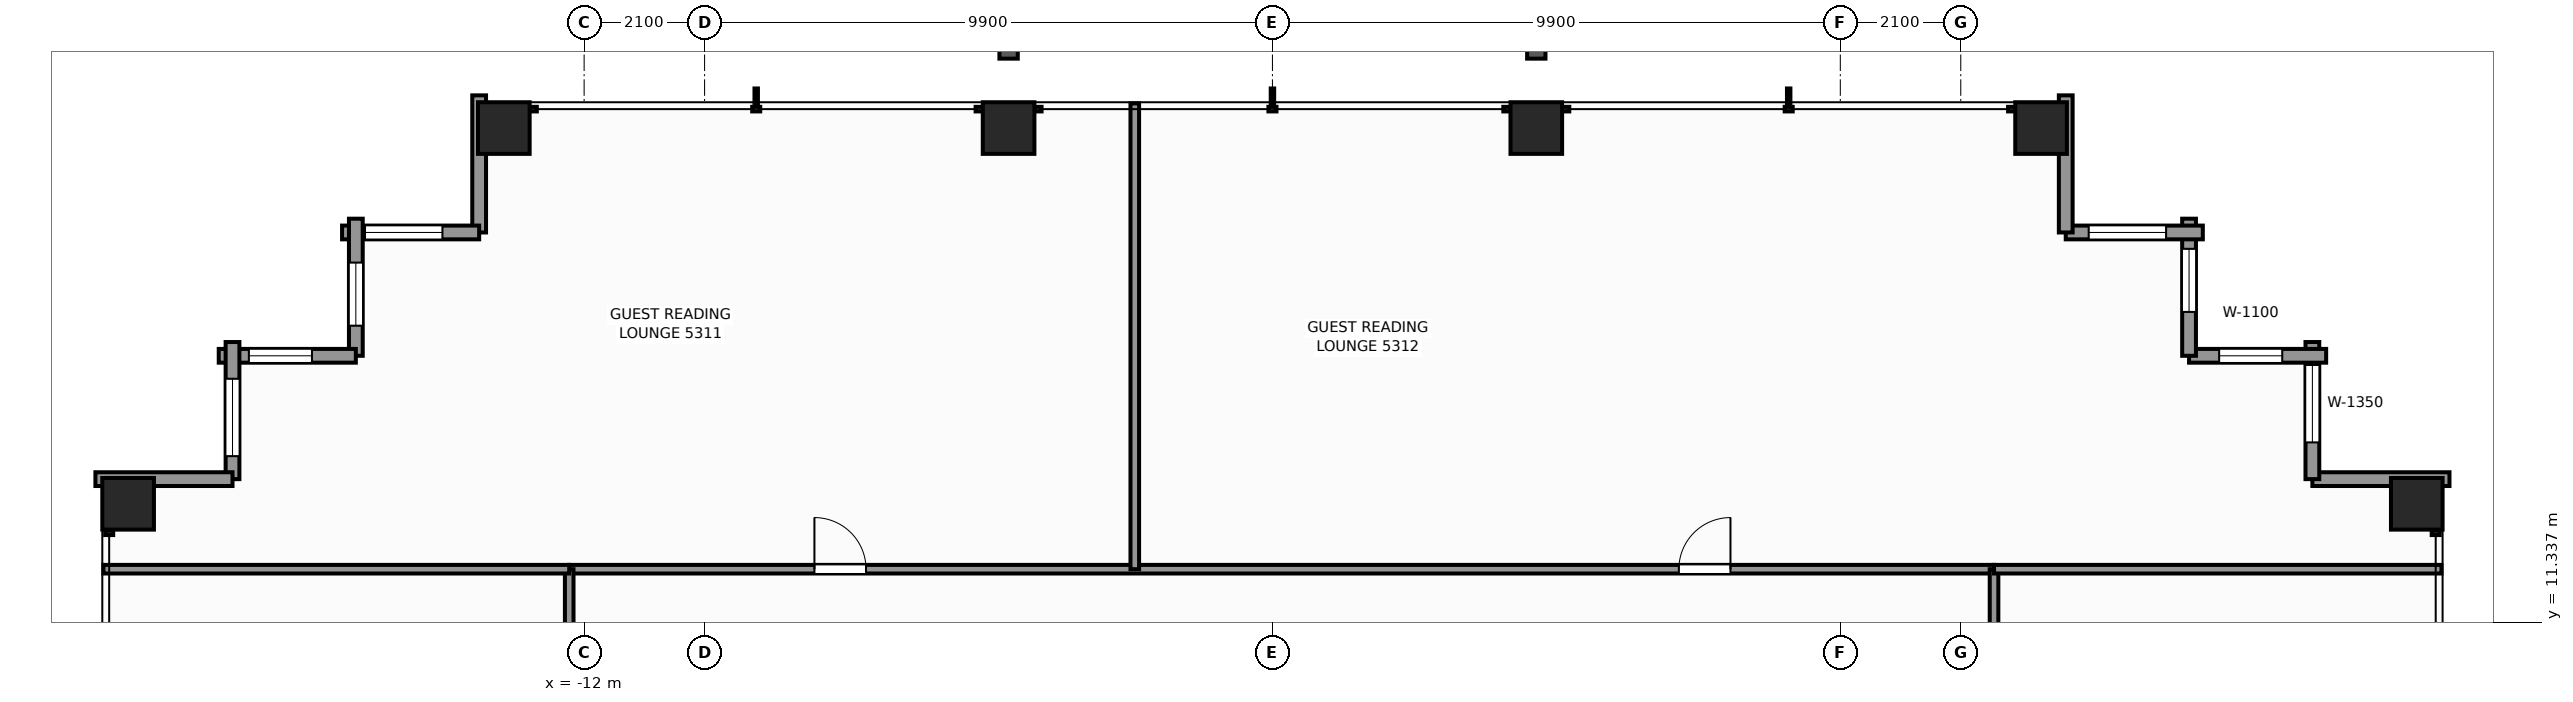
"""IFC4 building model, lengths in metres.
Left out: names, types, materials, properties, quantities, classifications, styles, units other than length and angle.
Written with IfcOpenShell. Run it as: python <this file> out.ifc"""

import sys

from ifc_helpers import new_model, si_unit, direction, frame, frame_2d, origin, origin_2d, place, context, subcontext, project, spatial, rectangle, extrude, element, fill, save


model = new_model("IFC4")
c1 = context("Model", 3, precision=1e-05, world=origin(), true_north=direction((0.0, 1.0)))
c2 = subcontext(c1, "Body", "Model", "MODEL_VIEW")
j1 = project(units=[si_unit("LENGTHUNIT", "METRE"), si_unit("PLANEANGLEUNIT", "RADIAN")], contexts=[c1])
p1 = place(None, origin())
s1 = spatial("IfcSite", under=j1, at=p1, CompositionType="ELEMENT")
p2 = place(p1, origin())
s2 = spatial("IfcBuilding", under=s1, at=p2, CompositionType="ELEMENT")
p3 = place(p2, frame((0.0, 0.0, 183.3)))
s3 = spatial("IfcBuildingStorey", under=s2, at=p3, CompositionType="ELEMENT", Elevation=183.3)
for number, where, z_axis, x_axis in (
    (1, (-13.4, 19.95, 0.0), (0.0, 0.0, 1.0), (1.0, 0.0, 0.0)),
    (2, (-4.6, 19.95, 0.0), (0.0, 0.0, 1.0), (1.0, 0.0, 0.0)),
    (3, (4.6, 19.95, 0.0), (0.0, 0.0, 1.0), (1.0, 0.0, 0.0)),
    (4, (13.4, 19.95, 0.0), (0.0, 0.0, 1.0), (1.0, 0.0, 0.0)),
    (5, (-19.95, 13.4, 0.0), (0.0, 0.0, 1.0), (1.0, 0.0, 0.0)),
    (6, (19.95, 13.4, 0.0), (0.0, 0.0, 1.0), (1.0, 0.0, 0.0)),
):
    element("IfcColumn", number, at=place(p3, frame(where, z_axis=z_axis, x_axis=x_axis)), inside=s3, PredefinedType="COLUMN", context=c2, shape_type="SweptSolid", body=[
        extrude(rectangle(XDim=0.9, YDim=0.9, at=origin_2d()), origin(), (0.0, 0.0, 1.0), 3.3),
    ])
p4 = place(p3, frame((18.13, 13.83, 0.0), z_axis=(0.0, 0.0, 1.0), x_axis=(1.0, 0.0, 0.0)))
e7 = element("IfcWall", 7, at=p4, inside=s3, PredefinedType="STANDARD", context=c2, shape_type="SweptSolid", body=[
    extrude(rectangle(XDim=2.39, YDim=0.24, at=frame_2d((1.195, 0.0))), origin(), (0.0, 0.0, 1.0), 2.463),
])
p5 = place(p3, frame((18.13, 16.22, 0.0), z_axis=(0.0, 0.0, 1.0), x_axis=(0.0, -1.0, 0.0)))
e8 = element("IfcWall", 8, at=p5, inside=s3, PredefinedType="STANDARD", context=c2, shape_type="SweptSolid", body=[
    extrude(rectangle(XDim=2.39, YDim=0.24, at=frame_2d((1.195, 0.0))), origin(), (0.0, 0.0, 1.0), 2.463),
])
p6 = place(p5, frame((0.4, 0.0, 0.65)))
e9 = element("IfcOpeningElement", 9, at=p6, cuts=e8, PredefinedType="OPENING", context=c2, shape_type="SweptSolid", body=[
    extrude(rectangle(XDim=1.35, YDim=1.55, at=frame_2d((0.675, 0.775))), frame((0.0, 0.13, 0.0), z_axis=(0.0, -1.0, 0.0), x_axis=(1.0, 0.0, 0.0)), (0.0, 0.0, 1.0), 0.26),
])
p7 = place(p3, frame((15.98, 15.98, 0.0), z_axis=(0.0, 0.0, 1.0), x_axis=(1.0, 0.0, 0.0)))
e10 = element("IfcWall", 10, at=p7, inside=s3, PredefinedType="STANDARD", context=c2, shape_type="SweptSolid", body=[
    extrude(rectangle(XDim=2.39, YDim=0.24, at=frame_2d((1.195, 0.0))), origin(), (0.0, 0.0, 1.0), 2.463),
])
p8 = place(p7, frame((0.525, 0.0, 0.65)))
e11 = element("IfcOpeningElement", 11, at=p8, cuts=e10, PredefinedType="OPENING", context=c2, shape_type="SweptSolid", body=[
    extrude(rectangle(XDim=1.1, YDim=1.45, at=frame_2d((0.55, 0.725))), frame((0.0, 0.13, 0.0), z_axis=(0.0, -1.0, 0.0), x_axis=(1.0, 0.0, 0.0)), (0.0, 0.0, 1.0), 0.26),
])
p9 = place(p3, frame((15.98, 18.37, 0.0), z_axis=(0.0, 0.0, 1.0), x_axis=(0.0, -1.0, 0.0)))
e12 = element("IfcWall", 12, at=p9, inside=s3, PredefinedType="STANDARD", context=c2, shape_type="SweptSolid", body=[
    extrude(rectangle(XDim=2.39, YDim=0.24, at=frame_2d((1.195, 0.0))), origin(), (0.0, 0.0, 1.0), 2.463),
])
p10 = place(p9, frame((0.525, 0.0, 0.65)))
e13 = element("IfcOpeningElement", 13, at=p10, cuts=e12, PredefinedType="OPENING", context=c2, shape_type="SweptSolid", body=[
    extrude(rectangle(XDim=1.1, YDim=1.45, at=frame_2d((0.55, 0.725))), frame((0.0, 0.13, 0.0), z_axis=(0.0, -1.0, 0.0), x_axis=(1.0, 0.0, 0.0)), (0.0, 0.0, 1.0), 0.26),
])
p11 = place(p3, frame((13.83, 18.13, 0.0), z_axis=(0.0, 0.0, 1.0), x_axis=(1.0, 0.0, 0.0)))
e14 = element("IfcWall", 14, at=p11, inside=s3, PredefinedType="STANDARD", context=c2, shape_type="SweptSolid", body=[
    extrude(rectangle(XDim=2.39, YDim=0.24, at=frame_2d((1.195, 0.0))), origin(), (0.0, 0.0, 1.0), 2.463),
])
p12 = place(p11, frame((0.4, 0.0, 0.65)))
e15 = element("IfcOpeningElement", 15, at=p12, cuts=e14, PredefinedType="OPENING", context=c2, shape_type="SweptSolid", body=[
    extrude(rectangle(XDim=1.35, YDim=1.55, at=frame_2d((0.675, 0.775))), frame((0.0, 0.13, 0.0), z_axis=(0.0, -1.0, 0.0), x_axis=(1.0, 0.0, 0.0)), (0.0, 0.0, 1.0), 0.26),
])
for number, where, z_axis, x_axis in (
    (16, (13.83, 20.52, 0.0), (0.0, 0.0, 1.0), (0.0, -1.0, 0.0)),
    (17, (-13.83, 18.13, 0.0), (0.0, 0.0, 1.0), (0.0, 1.0, 0.0)),
):
    element("IfcWall", number, at=place(p3, frame(where, z_axis=z_axis, x_axis=x_axis)), inside=s3, PredefinedType="STANDARD", context=c2, shape_type="SweptSolid", body=[
        extrude(rectangle(XDim=2.39, YDim=0.24, at=frame_2d((1.195, 0.0))), origin(), (0.0, 0.0, 1.0), 2.463),
    ])
p13 = place(p3, frame((-16.22, 18.13, 0.0), z_axis=(0.0, 0.0, 1.0), x_axis=(1.0, 0.0, 0.0)))
e18 = element("IfcWall", 18, at=p13, inside=s3, PredefinedType="STANDARD", context=c2, shape_type="SweptSolid", body=[
    extrude(rectangle(XDim=2.39, YDim=0.24, at=frame_2d((1.195, 0.0))), origin(), (0.0, 0.0, 1.0), 2.463),
])
p14 = place(p13, frame((0.4, 0.0, 0.65)))
e19 = element("IfcOpeningElement", 19, at=p14, cuts=e18, PredefinedType="OPENING", context=c2, shape_type="SweptSolid", body=[
    extrude(rectangle(XDim=1.35, YDim=1.55, at=frame_2d((0.675, 0.775))), frame((0.0, 0.13, 0.0), z_axis=(0.0, -1.0, 0.0), x_axis=(1.0, 0.0, 0.0)), (0.0, 0.0, 1.0), 0.26),
])
p15 = place(p3, frame((-15.98, 15.98, 0.0), z_axis=(0.0, 0.0, 1.0), x_axis=(0.0, 1.0, 0.0)))
e20 = element("IfcWall", 20, at=p15, inside=s3, PredefinedType="STANDARD", context=c2, shape_type="SweptSolid", body=[
    extrude(rectangle(XDim=2.39, YDim=0.24, at=frame_2d((1.195, 0.0))), origin(), (0.0, 0.0, 1.0), 2.463),
])
p16 = place(p15, frame((0.525, 0.0, 0.65)))
e21 = element("IfcOpeningElement", 21, at=p16, cuts=e20, PredefinedType="OPENING", context=c2, shape_type="SweptSolid", body=[
    extrude(rectangle(XDim=1.1, YDim=1.45, at=frame_2d((0.55, 0.725))), frame((0.0, 0.13, 0.0), z_axis=(0.0, -1.0, 0.0), x_axis=(1.0, 0.0, 0.0)), (0.0, 0.0, 1.0), 0.26),
])
p17 = place(p3, frame((-18.37, 15.98, 0.0), z_axis=(0.0, 0.0, 1.0), x_axis=(1.0, 0.0, 0.0)))
e22 = element("IfcWall", 22, at=p17, inside=s3, PredefinedType="STANDARD", context=c2, shape_type="SweptSolid", body=[
    extrude(rectangle(XDim=2.39, YDim=0.24, at=frame_2d((1.195, 0.0))), origin(), (0.0, 0.0, 1.0), 2.463),
])
p18 = place(p17, frame((0.525, 0.0, 0.65)))
e23 = element("IfcOpeningElement", 23, at=p18, cuts=e22, PredefinedType="OPENING", context=c2, shape_type="SweptSolid", body=[
    extrude(rectangle(XDim=1.1, YDim=1.45, at=frame_2d((0.55, 0.725))), frame((0.0, 0.13, 0.0), z_axis=(0.0, -1.0, 0.0), x_axis=(1.0, 0.0, 0.0)), (0.0, 0.0, 1.0), 0.26),
])
p19 = place(p3, frame((-18.13, 13.83, 0.0), z_axis=(0.0, 0.0, 1.0), x_axis=(0.0, 1.0, 0.0)))
e24 = element("IfcWall", 24, at=p19, inside=s3, PredefinedType="STANDARD", context=c2, shape_type="SweptSolid", body=[
    extrude(rectangle(XDim=2.39, YDim=0.24, at=frame_2d((1.195, 0.0))), origin(), (0.0, 0.0, 1.0), 2.463),
])
p20 = place(p19, frame((0.4, 0.0, 0.65)))
e25 = element("IfcOpeningElement", 25, at=p20, cuts=e24, PredefinedType="OPENING", context=c2, shape_type="SweptSolid", body=[
    extrude(rectangle(XDim=1.35, YDim=1.55, at=frame_2d((0.675, 0.775))), frame((0.0, 0.13, 0.0), z_axis=(0.0, -1.0, 0.0), x_axis=(1.0, 0.0, 0.0)), (0.0, 0.0, 1.0), 0.26),
])
p21 = place(p3, frame((-20.52, 13.83, 0.0), z_axis=(0.0, 0.0, 1.0), x_axis=(1.0, 0.0, 0.0)))
e26 = element("IfcWall", 26, at=p21, inside=s3, PredefinedType="STANDARD", context=c2, shape_type="SweptSolid", body=[
    extrude(rectangle(XDim=2.39, YDim=0.24, at=frame_2d((1.195, 0.0))), origin(), (0.0, 0.0, 1.0), 2.463),
])
p22 = place(p3, frame((-12.26, 12.26, 0.0), z_axis=(0.0, 0.0, 1.0), x_axis=(1.0, 0.0, 0.0)))
e27 = element("IfcWall", 27, at=p22, inside=s3, PredefinedType="PARTITIONING", context=c2, shape_type="SweptSolid", body=[
    extrude(rectangle(XDim=24.84, YDim=0.15, at=frame_2d((12.42, 0.0))), origin(), (0.0, 0.0, 1.0), 2.369),
])
p23 = place(p22, frame((4.275, 0.0, 0.0)))
e28 = element("IfcOpeningElement", 28, at=p23, cuts=e27, PredefinedType="OPENING", context=c2, shape_type="SweptSolid", body=[
    extrude(rectangle(XDim=0.9, YDim=2.06, at=frame_2d((0.45, 1.03))), frame((0.0, 0.085, 0.0), z_axis=(0.0, -1.0, 0.0), x_axis=(1.0, 0.0, 0.0)), (0.0, 0.0, 1.0), 0.17),
])
p24 = place(p22, frame((19.345, 0.0, 0.0)))
e29 = element("IfcOpeningElement", 29, at=p24, cuts=e27, PredefinedType="OPENING", context=c2, shape_type="SweptSolid", body=[
    extrude(rectangle(XDim=0.9, YDim=2.06, at=frame_2d((0.45, 1.03))), frame((0.0, 0.085, 0.0), z_axis=(0.0, -1.0, 0.0), x_axis=(1.0, 0.0, 0.0)), (0.0, 0.0, 1.0), 0.17),
])
p25 = place(p3, frame((-12.26, -12.58, 0.0), z_axis=(0.0, 0.0, 1.0), x_axis=(0.0, 1.0, 0.0)))
e30 = element("IfcWall", 30, at=p25, inside=s3, PredefinedType="PARTITIONING", context=c2, shape_type="SweptSolid", body=[
    extrude(rectangle(XDim=24.84, YDim=0.15, at=frame_2d((12.42, 0.0))), origin(), (0.0, 0.0, 1.0), 2.369),
])
p26 = place(p25, frame((3.114, 0.0, 0.0)))
e31 = element("IfcOpeningElement", 31, at=p26, cuts=e30, PredefinedType="OPENING", context=c2, shape_type="SweptSolid", body=[
    extrude(rectangle(XDim=0.95, YDim=2.06, at=frame_2d((0.475, 1.03))), frame((0.0, 0.085, 0.0), z_axis=(0.0, -1.0, 0.0), x_axis=(1.0, 0.0, 0.0)), (0.0, 0.0, 1.0), 0.17),
])
p27 = place(p25, frame((9.119, 0.0, 0.0)))
e32 = element("IfcOpeningElement", 32, at=p27, cuts=e30, PredefinedType="OPENING", context=c2, shape_type="SweptSolid", body=[
    extrude(rectangle(XDim=0.95, YDim=2.06, at=frame_2d((0.475, 1.03))), frame((0.0, 0.085, 0.0), z_axis=(0.0, -1.0, 0.0), x_axis=(1.0, 0.0, 0.0)), (0.0, 0.0, 1.0), 0.17),
])
p28 = place(p25, frame((14.24, 0.0, 0.0)))
e33 = element("IfcOpeningElement", 33, at=p28, cuts=e30, PredefinedType="OPENING", context=c2, shape_type="SweptSolid", body=[
    extrude(rectangle(XDim=0.95, YDim=2.06, at=frame_2d((0.475, 1.03))), frame((0.0, 0.085, 0.0), z_axis=(0.0, -1.0, 0.0), x_axis=(1.0, 0.0, 0.0)), (0.0, 0.0, 1.0), 0.17),
])
p29 = place(p25, frame((19.574, 0.0, 0.0)))
e34 = element("IfcOpeningElement", 34, at=p29, cuts=e30, PredefinedType="OPENING", context=c2, shape_type="SweptSolid", body=[
    extrude(rectangle(XDim=0.95, YDim=2.06, at=frame_2d((0.475, 1.03))), frame((0.0, 0.085, 0.0), z_axis=(0.0, -1.0, 0.0), x_axis=(1.0, 0.0, 0.0)), (0.0, 0.0, 1.0), 0.17),
])
p30 = place(p25, frame((21.254, 0.0, 0.0)))
e35 = element("IfcOpeningElement", 35, at=p30, cuts=e30, PredefinedType="OPENING", context=c2, shape_type="SweptSolid", body=[
    extrude(rectangle(XDim=0.9, YDim=2.06, at=frame_2d((0.45, 1.03))), frame((0.0, 0.085, 0.0), z_axis=(0.0, -1.0, 0.0), x_axis=(1.0, 0.0, 0.0)), (0.0, 0.0, 1.0), 0.17),
])
p31 = place(p3, frame((12.58, -12.58, 0.0), z_axis=(0.0, 0.0, 1.0), x_axis=(0.0, 1.0, 0.0)))
e36 = element("IfcWall", 36, at=p31, inside=s3, PredefinedType="PARTITIONING", context=c2, shape_type="SweptSolid", body=[
    extrude(rectangle(XDim=24.84, YDim=0.15, at=frame_2d((12.42, 0.0))), origin(), (0.0, 0.0, 1.0), 2.369),
])
p32 = place(p31, frame((4.595, 0.0, 0.0)))
e37 = element("IfcOpeningElement", 37, at=p32, cuts=e36, PredefinedType="OPENING", context=c2, shape_type="SweptSolid", body=[
    extrude(rectangle(XDim=0.9, YDim=2.06, at=frame_2d((0.45, 1.03))), frame((0.0, 0.085, 0.0), z_axis=(0.0, -1.0, 0.0), x_axis=(1.0, 0.0, 0.0)), (0.0, 0.0, 1.0), 0.17),
])
p33 = place(p31, frame((19.665, 0.0, 0.0)))
e38 = element("IfcOpeningElement", 38, at=p33, cuts=e36, PredefinedType="OPENING", context=c2, shape_type="SweptSolid", body=[
    extrude(rectangle(XDim=0.9, YDim=2.06, at=frame_2d((0.45, 1.03))), frame((0.0, 0.085, 0.0), z_axis=(0.0, -1.0, 0.0), x_axis=(1.0, 0.0, 0.0)), (0.0, 0.0, 1.0), 0.17),
])
p34 = place(p3, frame((-20.38, 12.26, 0.0), z_axis=(0.0, 0.0, 1.0), x_axis=(1.0, 0.0, 0.0)))
e39 = element("IfcWall", 39, at=p34, inside=s3, PredefinedType="PARTITIONING", context=c2, shape_type="SweptSolid", body=[
    extrude(rectangle(XDim=8.12, YDim=0.15, at=frame_2d((4.06, 0.0))), origin(), (0.0, 0.0, 1.0), 2.369),
])
p35 = place(p3, frame((12.58, 12.26, 0.0), z_axis=(0.0, 0.0, 1.0), x_axis=(1.0, 0.0, 0.0)))
e40 = element("IfcWall", 40, at=p35, inside=s3, PredefinedType="PARTITIONING", context=c2, shape_type="SweptSolid", body=[
    extrude(rectangle(XDim=7.8, YDim=0.15, at=frame_2d((3.9, 0.0))), origin(), (0.0, 0.0, 1.0), 2.369),
])
p36 = place(p3, frame((-2.4, 12.26, 0.0), z_axis=(0.0, 0.0, 1.0), x_axis=(0.0, 1.0, 0.0)))
e41 = element("IfcWall", 41, at=p36, inside=s3, PredefinedType="PARTITIONING", context=c2, shape_type="SweptSolid", body=[
    extrude(rectangle(XDim=8.12, YDim=0.15, at=frame_2d((4.06, 0.0))), origin(), (0.0, 0.0, 1.0), 2.453),
])
p37 = place(p6, origin())
e42 = element("IfcWindow", 42, at=p37, inside=s3, PartitioningType="SINGLE_PANEL", PredefinedType="WINDOW", context=c2, shape_type="SweptSolid", body=[
    extrude(rectangle(XDim=1.35, YDim=1.55, at=frame_2d((0.675, 0.775))), frame((0.0, 0.03, 0.0), z_axis=(0.0, -1.0, 0.0), x_axis=(1.0, 0.0, 0.0)), (0.0, 0.0, 1.0), 0.06),
])
fill(e9, e42)
p38 = place(p8, origin())
e43 = element("IfcWindow", 43, at=p38, inside=s3, PartitioningType="SINGLE_PANEL", PredefinedType="WINDOW", context=c2, shape_type="SweptSolid", body=[
    extrude(rectangle(XDim=1.1, YDim=1.45, at=frame_2d((0.55, 0.725))), frame((0.0, 0.03, 0.0), z_axis=(0.0, -1.0, 0.0), x_axis=(1.0, 0.0, 0.0)), (0.0, 0.0, 1.0), 0.06),
])
fill(e11, e43)
p39 = place(p10, origin())
e44 = element("IfcWindow", 44, at=p39, inside=s3, PartitioningType="SINGLE_PANEL", PredefinedType="WINDOW", context=c2, shape_type="SweptSolid", body=[
    extrude(rectangle(XDim=1.1, YDim=1.45, at=frame_2d((0.55, 0.725))), frame((0.0, 0.03, 0.0), z_axis=(0.0, -1.0, 0.0), x_axis=(1.0, 0.0, 0.0)), (0.0, 0.0, 1.0), 0.06),
])
fill(e13, e44)
p40 = place(p12, origin())
e45 = element("IfcWindow", 45, at=p40, inside=s3, PartitioningType="SINGLE_PANEL", PredefinedType="WINDOW", context=c2, shape_type="SweptSolid", body=[
    extrude(rectangle(XDim=1.35, YDim=1.55, at=frame_2d((0.675, 0.775))), frame((0.0, 0.03, 0.0), z_axis=(0.0, -1.0, 0.0), x_axis=(1.0, 0.0, 0.0)), (0.0, 0.0, 1.0), 0.06),
])
fill(e15, e45)
p41 = place(p14, origin())
e46 = element("IfcWindow", 46, at=p41, inside=s3, PartitioningType="SINGLE_PANEL", PredefinedType="WINDOW", context=c2, shape_type="SweptSolid", body=[
    extrude(rectangle(XDim=1.35, YDim=1.55, at=frame_2d((0.675, 0.775))), frame((0.0, 0.03, 0.0), z_axis=(0.0, -1.0, 0.0), x_axis=(1.0, 0.0, 0.0)), (0.0, 0.0, 1.0), 0.06),
])
fill(e19, e46)
p42 = place(p16, origin())
e47 = element("IfcWindow", 47, at=p42, inside=s3, PartitioningType="SINGLE_PANEL", PredefinedType="WINDOW", context=c2, shape_type="SweptSolid", body=[
    extrude(rectangle(XDim=1.1, YDim=1.45, at=frame_2d((0.55, 0.725))), frame((0.0, 0.03, 0.0), z_axis=(0.0, -1.0, 0.0), x_axis=(1.0, 0.0, 0.0)), (0.0, 0.0, 1.0), 0.06),
])
fill(e21, e47)
p43 = place(p18, origin())
e48 = element("IfcWindow", 48, at=p43, inside=s3, PartitioningType="SINGLE_PANEL", PredefinedType="WINDOW", context=c2, shape_type="SweptSolid", body=[
    extrude(rectangle(XDim=1.1, YDim=1.45, at=frame_2d((0.55, 0.725))), frame((0.0, 0.03, 0.0), z_axis=(0.0, -1.0, 0.0), x_axis=(1.0, 0.0, 0.0)), (0.0, 0.0, 1.0), 0.06),
])
fill(e23, e48)
p44 = place(p20, origin())
e49 = element("IfcWindow", 49, at=p44, inside=s3, PartitioningType="SINGLE_PANEL", PredefinedType="WINDOW", context=c2, shape_type="SweptSolid", body=[
    extrude(rectangle(XDim=1.35, YDim=1.55, at=frame_2d((0.675, 0.775))), frame((0.0, 0.03, 0.0), z_axis=(0.0, -1.0, 0.0), x_axis=(1.0, 0.0, 0.0)), (0.0, 0.0, 1.0), 0.06),
])
fill(e25, e49)
p45 = place(p23, origin())
e50 = element("IfcDoor", 50, at=p45, inside=s3, OperationType="SINGLE_SWING_LEFT", PredefinedType="DOOR", context=c2, shape_type="SweptSolid", body=[
    extrude(rectangle(XDim=0.9, YDim=2.06, at=frame_2d((0.45, 1.03))), frame((0.0, 0.025, 0.0), z_axis=(0.0, -1.0, 0.0), x_axis=(1.0, 0.0, 0.0)), (0.0, 0.0, 1.0), 0.05),
])
fill(e28, e50)
p46 = place(p24, origin())
e51 = element("IfcDoor", 51, at=p46, inside=s3, OperationType="SINGLE_SWING_RIGHT", PredefinedType="DOOR", context=c2, shape_type="SweptSolid", body=[
    extrude(rectangle(XDim=0.9, YDim=2.06, at=frame_2d((0.45, 1.03))), frame((0.0, 0.025, 0.0), z_axis=(0.0, -1.0, 0.0), x_axis=(1.0, 0.0, 0.0)), (0.0, 0.0, 1.0), 0.05),
])
fill(e29, e51)
save(model, sys.argv[1])
